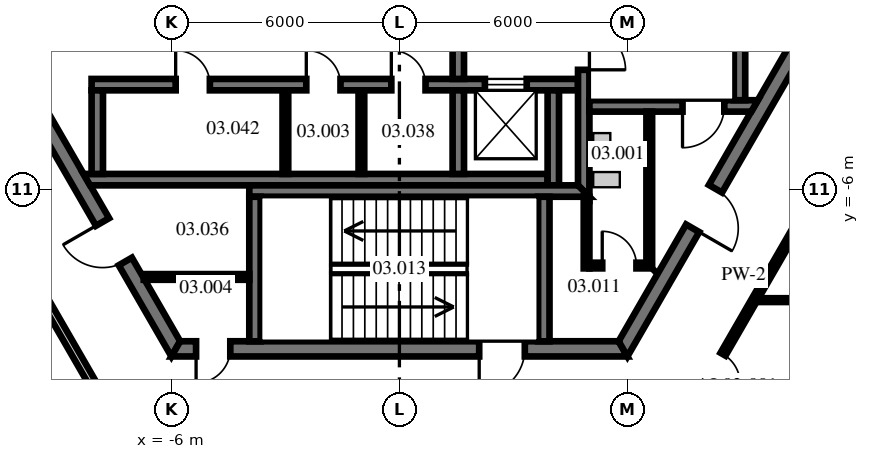
"""IFC4 building model, lengths in metres.
Left out: names, types, materials, properties, quantities, classifications, styles, units other than length and angle.
Written with IfcOpenShell. Run it as: python <this file> out.ifc"""

import sys

from ifc_helpers import new_model, si_unit, direction, frame, frame_2d, origin, place, context, subcontext, project, spatial, polyline, rectangle, outline, extrude, source, transform, mapped, element, fill, save


model = new_model("IFC4")
c1 = context("Model", 3, precision=1e-05, world=origin(), true_north=direction((0.0, 1.0)))
c2 = subcontext(c1, "Body", "Model", "MODEL_VIEW")
j1 = project(units=[si_unit("LENGTHUNIT", "METRE"), si_unit("PLANEANGLEUNIT", "RADIAN")], contexts=[c1])
p1 = place(None, origin())
s1 = spatial("IfcSite", under=j1, at=p1, CompositionType="ELEMENT")
p2 = place(p1, origin())
s2 = spatial("IfcBuilding", under=s1, at=p2, CompositionType="ELEMENT")
p3 = place(p2, frame((0.0, 0.0, 16.0)))
s3 = spatial("IfcBuildingStorey", under=s2, at=p3, CompositionType="ELEMENT", Elevation=16.0)
m1 = source(origin(), c2, "Body", "SweptSolid", [
    extrude(outline(polyline([(-0.115, -0.2), (11.885, -0.2), (11.654, 0.2), (0.115, 0.2), (-0.115, -0.2)])), origin(), (0.0, 0.0, 1.0), 4.1),
])
p4 = place(p3, frame((-11.769, 0.0, 0.0), z_axis=(0.0, 0.0, 1.0), x_axis=(0.499996592174, -0.866027371285, 0.0)))
e1 = element("IfcWall", 1, at=p4, inside=s3, PredefinedType="SHEAR", context=c2, shape_type="MappedRepresentation", body=[
    mapped(m1, transform((0.0, 0.0, 0.0), scale=1.0)),
])
p5 = place(p4, frame((1.405, 0.0, 0.0)))
e2 = element("IfcOpeningElement", 2, at=p5, cuts=e1, PredefinedType="OPENING", context=c2, shape_type="SweptSolid", body=[
    extrude(rectangle(XDim=1.8, YDim=2.1, at=frame_2d((0.9, 1.05))), frame((0.0, 0.21, 0.0), z_axis=(0.0, -1.0, 0.0), x_axis=(1.0, 0.0, 0.0)), (0.0, 0.0, 1.0), 0.42),
])
p6 = place(p4, frame((7.915, 0.0, 0.0)))
e3 = element("IfcOpeningElement", 3, at=p6, cuts=e1, PredefinedType="OPENING", context=c2, shape_type="SweptSolid", body=[
    extrude(rectangle(XDim=1.2, YDim=2.1, at=frame_2d((0.6, 1.05))), frame((0.0, 0.21, 0.0), z_axis=(0.0, -1.0, 0.0), x_axis=(1.0, 0.0, 0.0)), (0.0, 0.0, 1.0), 0.42),
])
p7 = place(p3, frame((-5.885, -10.192, 0.0), z_axis=(0.0, 0.0, 1.0), x_axis=(1.0, 0.0, 0.0)))
e4 = element("IfcWall", 4, at=p7, inside=s3, PredefinedType="SHEAR", context=c2, shape_type="MappedRepresentation", body=[
    mapped(m1, transform((0.0, 0.0, 0.0), scale=1.0)),
])
p8 = place(p7, frame((7.985, 0.0, 0.0)))
e5 = element("IfcOpeningElement", 5, at=p8, cuts=e4, PredefinedType="OPENING", context=c2, shape_type="SweptSolid", body=[
    extrude(rectangle(XDim=1.2, YDim=2.1, at=frame_2d((0.6, 1.05))), frame((0.0, 0.21, 0.0), z_axis=(0.0, -1.0, 0.0), x_axis=(1.0, 0.0, 0.0)), (0.0, 0.0, 1.0), 0.42),
])
p9 = place(p7, frame((0.534, 0.0, 0.0)))
e6 = element("IfcOpeningElement", 6, at=p9, cuts=e4, PredefinedType="OPENING", context=c2, shape_type="SweptSolid", body=[
    extrude(rectangle(XDim=0.9, YDim=2.1, at=frame_2d((0.45, 1.05))), frame((0.0, 0.21, 0.0), z_axis=(0.0, -1.0, 0.0), x_axis=(1.0, 0.0, 0.0)), (0.0, 0.0, 1.0), 0.42),
])
p10 = place(p3, frame((5.885, -10.192, 0.0), z_axis=(0.0, 0.0, 1.0), x_axis=(0.499996592174, 0.866027371285, 0.0)))
e7 = element("IfcWall", 7, at=p10, inside=s3, PredefinedType="SHEAR", context=c2, shape_type="MappedRepresentation", body=[
    mapped(m1, transform((0.0, 0.0, 0.0), scale=1.0)),
])
p11 = place(p10, frame((3.665, 0.0, 0.0)))
e8 = element("IfcOpeningElement", 8, at=p11, cuts=e7, PredefinedType="OPENING", context=c2, shape_type="SweptSolid", body=[
    extrude(rectangle(XDim=1.2, YDim=2.1, at=frame_2d((0.6, 1.05))), frame((0.0, 0.21, 0.0), z_axis=(0.0, -1.0, 0.0), x_axis=(1.0, 0.0, 0.0)), (0.0, 0.0, 1.0), 0.42),
])
m2 = source(origin(), c2, "Body", "SweptSolid", [
    extrude(rectangle(XDim=12.8, YDim=0.3, at=frame_2d((6.4, 0.0))), origin(), (0.0, 0.0, 1.0), 4.1),
])
p12 = place(p3, frame((-8.1, -3.24, 0.0), z_axis=(0.0, 0.0, 1.0), x_axis=(1.0, 0.0, 0.0)))
e9 = element("IfcWall", 9, at=p12, inside=s3, PredefinedType="SHEAR", context=c2, shape_type="MappedRepresentation", body=[
    mapped(m2, transform((0.0, 0.0, 0.0), scale=1.0)),
])
p13 = place(p12, frame((2.212, 0.0, 0.0)))
e10 = element("IfcOpeningElement", 10, at=p13, cuts=e9, PredefinedType="OPENING", context=c2, shape_type="SweptSolid", body=[
    extrude(rectangle(XDim=0.9, YDim=2.1, at=frame_2d((0.45, 1.05))), frame((0.0, 0.16, 0.0), z_axis=(0.0, -1.0, 0.0), x_axis=(1.0, 0.0, 0.0)), (0.0, 0.0, 1.0), 0.32),
])
p14 = place(p12, frame((5.65, 0.0, 0.0)))
e11 = element("IfcOpeningElement", 11, at=p14, cuts=e9, PredefinedType="OPENING", context=c2, shape_type="SweptSolid", body=[
    extrude(rectangle(XDim=0.9, YDim=2.1, at=frame_2d((0.45, 1.05))), frame((0.0, 0.16, 0.0), z_axis=(0.0, -1.0, 0.0), x_axis=(1.0, 0.0, 0.0)), (0.0, 0.0, 1.0), 0.32),
])
p15 = place(p12, frame((7.887, 0.0, 0.0)))
e12 = element("IfcOpeningElement", 12, at=p15, cuts=e9, PredefinedType="OPENING", context=c2, shape_type="SweptSolid", body=[
    extrude(rectangle(XDim=0.9, YDim=2.1, at=frame_2d((0.45, 1.05))), frame((0.0, 0.16, 0.0), z_axis=(0.0, -1.0, 0.0), x_axis=(1.0, 0.0, 0.0)), (0.0, 0.0, 1.0), 0.32),
])
p16 = place(p12, frame((10.35, 0.0, 0.0)))
e13 = element("IfcOpeningElement", 13, at=p16, cuts=e9, PredefinedType="OPENING", context=c2, shape_type="SweptSolid", body=[
    extrude(rectangle(XDim=1.1, YDim=2.1, at=frame_2d((0.55, 1.05))), frame((0.0, 0.16, 0.0), z_axis=(0.0, -1.0, 0.0), x_axis=(1.0, 0.0, 0.0)), (0.0, 0.0, 1.0), 0.32),
])
m3 = source(origin(), c2, "Body", "SweptSolid", [
    extrude(outline(polyline([(12.0, -0.15), (-0.04, -0.15), (-0.213, 0.15), (12.0, 0.15), (12.0, -0.15)])), origin(), (0.0, 0.0, 1.0), 4.1),
])
p17 = place(p3, frame((-8.1, -5.74, 0.0), z_axis=(0.0, 0.0, 1.0), x_axis=(1.0, 0.0, 0.0)))
e14 = element("IfcWall", 14, at=p17, inside=s3, PredefinedType="SHEAR", context=c2, shape_type="MappedRepresentation", body=[
    mapped(m3, transform((0.0, 0.0, 0.0), scale=1.0)),
])
m4 = source(origin(), c2, "Body", "SweptSolid", [
    extrude(rectangle(XDim=2.2, YDim=0.3, at=frame_2d((1.1, 0.0))), origin(), (0.0, 0.0, 1.0), 4.1),
])
for number, where, z_axis, x_axis in (
    (15, (-7.95, -5.59, 0.0), (0.0, 0.0, 1.0), (0.0, 1.0, 0.0)),
    (16, (1.55, -5.59, 0.0), (0.0, 0.0, 1.0), (0.0, 1.0, 0.0)),
):
    element("IfcWall", number, at=place(p3, frame(where, z_axis=z_axis, x_axis=x_axis)), inside=s3, PredefinedType="SHEAR", context=c2, shape_type="MappedRepresentation", body=[
        mapped(m4, transform((0.0, 0.0, 0.0), scale=1.0)),
    ])
m5 = source(origin(), c2, "Body", "SweptSolid", [
    extrude(rectangle(XDim=2.5, YDim=0.3, at=frame_2d((1.25, 0.0))), origin(), (0.0, 0.0, 1.0), 4.1),
])
p18 = place(p3, frame((4.05, -5.89, 0.0), z_axis=(0.0, 0.0, 1.0), x_axis=(0.0, 1.0, 0.0)))
e17 = element("IfcWall", 17, at=p18, inside=s3, PredefinedType="SHEAR", context=c2, shape_type="MappedRepresentation", body=[
    mapped(m5, transform((0.0, 0.0, 0.0), scale=1.0)),
])
m6 = source(origin(), c2, "Body", "SweptSolid", [
    extrude(rectangle(XDim=3.0, YDim=0.3, at=frame_2d((1.5, 0.0))), origin(), (0.0, 0.0, 1.0), 4.1),
])
p19 = place(p3, frame((1.55, -3.09, 0.0), z_axis=(0.0, 0.0, 1.0), x_axis=(0.0, 1.0, 0.0)))
e18 = element("IfcWall", 18, at=p19, inside=s3, PredefinedType="SHEAR", context=c2, shape_type="MappedRepresentation", body=[
    mapped(m6, transform((0.0, 0.0, 0.0), scale=1.0)),
])
p20 = place(p19, frame((0.9, 0.0, 0.0)))
e19 = element("IfcOpeningElement", 19, at=p20, cuts=e18, PredefinedType="OPENING", context=c2, shape_type="SweptSolid", body=[
    extrude(rectangle(XDim=1.2, YDim=2.1, at=frame_2d((0.6, 1.05))), frame((0.0, 0.16, 0.0), z_axis=(0.0, -1.0, 0.0), x_axis=(1.0, 0.0, 0.0)), (0.0, 0.0, 1.0), 0.32),
])
m7 = source(origin(), c2, "Body", "SweptSolid", [
    extrude(outline(polyline([(-0.15, -0.15), (9.99, -0.15), (9.99, 0.15), (0.15, 0.15), (-0.15, -0.15)])), origin(), (0.0, 0.0, 1.0), 4.1),
])
p21 = place(p3, frame((4.85, -6.04, 0.0), z_axis=(0.0, 0.0, 1.0), x_axis=(0.0, 1.0, 0.0)))
e20 = element("IfcWall", 20, at=p21, inside=s3, PredefinedType="SHEAR", context=c2, shape_type="MappedRepresentation", body=[
    mapped(m7, transform((0.0, 0.0, 0.0), scale=1.0)),
])
p22 = place(p21, frame((3.19, 0.0, 0.0)))
e21 = element("IfcOpeningElement", 21, at=p22, cuts=e20, PredefinedType="OPENING", context=c2, shape_type="SweptSolid", body=[
    extrude(rectangle(XDim=1.1, YDim=2.1, at=frame_2d((0.55, 1.05))), frame((0.0, 0.16, 0.0), z_axis=(0.0, -1.0, 0.0), x_axis=(1.0, 0.0, 0.0)), (0.0, 0.0, 1.0), 0.32),
])
m8 = source(origin(), c2, "Body", "SweptSolid", [
    extrude(outline(polyline([(0.0, -0.15), (0.0, 0.15), (4.433, 0.15), (4.26, -0.15), (0.0, -0.15)])), origin(), (0.0, 0.0, 1.0), 4.1),
])
p23 = place(p3, frame((5.0, -3.8, 0.0), z_axis=(0.0, 0.0, 1.0), x_axis=(1.0, 0.0, 0.0)))
e22 = element("IfcWall", 22, at=p23, inside=s3, PredefinedType="SHEAR", context=c2, shape_type="MappedRepresentation", body=[
    mapped(m8, transform((0.0, 0.0, 0.0), scale=1.0)),
])
p24 = place(p23, frame((2.45, 0.0, 0.0)))
e23 = element("IfcOpeningElement", 23, at=p24, cuts=e22, PredefinedType="OPENING", context=c2, shape_type="SweptSolid", body=[
    extrude(rectangle(XDim=1.1, YDim=2.1, at=frame_2d((0.55, 1.05))), frame((0.0, 0.16, 0.0), z_axis=(0.0, -1.0, 0.0), x_axis=(1.0, 0.0, 0.0)), (0.0, 0.0, 1.0), 0.32),
])
m9 = source(origin(), c2, "Body", "SweptSolid", [
    extrude(rectangle(XDim=7.3, YDim=0.3, at=frame_2d((3.65, 0.0))), origin(), (0.0, 0.0, 1.0), 4.1),
])
p25 = place(p3, frame((8.95, -3.65, 0.0), z_axis=(0.0, 0.0, 1.0), x_axis=(0.0, 1.0, 0.0)))
e24 = element("IfcWall", 24, at=p25, inside=s3, PredefinedType="SHEAR", context=c2, shape_type="MappedRepresentation", body=[
    mapped(m9, transform((0.0, 0.0, 0.0), scale=1.0)),
])
m10 = source(origin(), c2, "Body", "SweptSolid", [
    extrude(outline(polyline([(0.0, -0.15), (8.95, -0.15), (8.65, 0.15), (0.0, 0.15), (0.0, -0.15)])), origin(), (0.0, 0.0, 1.0), 4.1),
])
p26 = place(p3, frame((-3.95, -6.04, 0.0), z_axis=(0.0, 0.0, 1.0), x_axis=(1.0, 0.0, 0.0)))
e25 = element("IfcWall", 25, at=p26, inside=s3, PredefinedType="SHEAR", context=c2, shape_type="MappedRepresentation", body=[
    mapped(m10, transform((0.0, 0.0, 0.0), scale=1.0)),
])
m11 = source(origin(), c2, "Body", "SweptSolid", [
    extrude(outline(polyline([(3.8, -0.15), (-0.004, -0.15), (-0.004, 0.15), (3.8, 0.15), (3.8, -0.15)])), origin(), (0.0, 0.0, 1.0), 4.1),
])
for number, where, z_axis, x_axis in (
    (26, (-3.8, -9.99, 0.0), (0.0, 0.0, 1.0), (0.0, 1.0, 0.0)),
    (27, (3.8, -9.99, 0.0), (0.0, 0.0, 1.0), (0.0, 1.0, 0.0)),
):
    element("IfcWall", number, at=place(p3, frame(where, z_axis=z_axis, x_axis=x_axis)), inside=s3, PredefinedType="SHEAR", context=c2, shape_type="MappedRepresentation", body=[
        mapped(m11, transform((0.0, 0.0, 0.0), scale=1.0)),
    ])
m12 = source(origin(), c2, "Body", "SweptSolid", [
    extrude(rectangle(XDim=2.2, YDim=0.15, at=frame_2d((1.1, 0.0))), origin(), (0.0, 0.0, 1.0), 4.1),
])
for number, where, z_axis, x_axis in (
    (28, (-3.0, -5.59, 0.0), (0.0, 0.0, 1.0), (0.0, 1.0, 0.0)),
    (29, (-1.0, -5.59, 0.0), (0.0, 0.0, 1.0), (0.0, 1.0, 0.0)),
):
    element("IfcWall", number, at=place(p3, frame(where, z_axis=z_axis, x_axis=x_axis)), inside=s3, PredefinedType="PARTITIONING", context=c2, shape_type="MappedRepresentation", body=[
        mapped(m12, transform((0.0, 0.0, 0.0), scale=1.0)),
    ])
p27 = place(p3, frame((-6.727, -8.3, 0.0), z_axis=(0.0, 0.0, 1.0), x_axis=(1.0, 0.0, 0.0)))
e30 = element("IfcWall", 30, at=p27, inside=s3, PredefinedType="PARTITIONING", context=c2, shape_type="SweptSolid", body=[
    extrude(rectangle(XDim=2.777, YDim=0.15, at=frame_2d((1.389, 0.0))), origin(), (0.0, 0.0, 1.0), 4.1),
])
m13 = source(origin(), c2, "Body", "SweptSolid", [
    extrude(outline(polyline([(0.0, -0.075), (1.65, -0.075), (1.5, 0.075), (0.0, 0.075), (0.0, -0.075)])), origin(), (0.0, 0.0, 1.0), 4.1),
])
p28 = place(p3, frame((5.0, -8.0, 0.0), z_axis=(0.0, 0.0, 1.0), x_axis=(1.0, 0.0, 0.0)))
e31 = element("IfcWall", 31, at=p28, inside=s3, PredefinedType="PARTITIONING", context=c2, shape_type="MappedRepresentation", body=[
    mapped(m13, transform((0.0, 0.0, 0.0), scale=1.0)),
])
p29 = place(p28, frame((0.337, 0.0, 0.0)))
e32 = element("IfcOpeningElement", 32, at=p29, cuts=e31, PredefinedType="OPENING", context=c2, shape_type="SweptSolid", body=[
    extrude(rectangle(XDim=0.9, YDim=2.1, at=frame_2d((0.45, 1.05))), frame((0.0, 0.085, 0.0), z_axis=(0.0, -1.0, 0.0), x_axis=(1.0, 0.0, 0.0)), (0.0, 0.0, 1.0), 0.17),
])
p30 = place(p3, frame((6.575, -8.0, 0.0), z_axis=(0.0, 0.0, 1.0), x_axis=(0.0, 1.0, 0.0)))
e33 = element("IfcWall", 33, at=p30, inside=s3, PredefinedType="PARTITIONING", context=c2, shape_type="SweptSolid", body=[
    extrude(outline(polyline([(-0.075, -0.075), (4.05, -0.075), (4.05, 0.075), (0.075, 0.075), (-0.075, -0.075)])), origin(), (0.0, 0.0, 1.0), 4.1),
])
p31 = place(p3, frame((4.925, -8.075, 0.0), z_axis=(0.0, 0.0, 1.0), x_axis=(0.0, 1.0, 0.0)))
e34 = element("IfcWall", 34, at=p31, inside=s3, PredefinedType="PARTITIONING", context=c2, shape_type="SweptSolid", body=[
    extrude(rectangle(XDim=1.885, YDim=0.15, at=frame_2d((0.942, 0.0))), origin(), (0.0, 0.0, 1.0), 4.1),
])
p32 = place(p3, frame((-11.818, -4.615, 0.0), z_axis=(0.0, 0.0, 1.0), x_axis=(0.500011831956, -0.866018572493, 0.0)))
e35 = element("IfcWall", 35, at=p32, inside=s3, PredefinedType="PARTITIONING", context=c2, shape_type="SweptSolid", body=[
    extrude(rectangle(XDim=9.153, YDim=0.2, at=frame_2d((4.577, 0.0))), origin(), (0.0, 0.0, 1.0), 4.1),
])
m14 = source(origin(), c2, "Body", "SweptSolid", [
    extrude(rectangle(XDim=12.148, YDim=0.1, at=frame_2d((6.074, 0.0))), origin(), (0.0, 0.0, 1.0), 3.343),
])
p33 = place(p3, frame((9.338, -8.91, 0.0), z_axis=(0.0, 0.0, 1.0), x_axis=(1.0, 0.0, 0.0)))
e36 = element("IfcWall", 36, at=p33, inside=s3, PredefinedType="PARTITIONING", context=c2, shape_type="MappedRepresentation", body=[
    mapped(m14, transform((0.0, 0.0, 0.0), scale=1.0)),
])
p34 = place(p3, frame((7.251, -12.525, 0.0), z_axis=(0.0, 0.0, 1.0), x_axis=(0.499988071196, 0.866032290773, 0.0)))
e37 = element("IfcWall", 37, at=p34, inside=s3, PredefinedType="PARTITIONING", context=c2, shape_type="SweptSolid", body=[
    extrude(rectangle(XDim=9.203, YDim=0.15, at=frame_2d((4.602, 0.0))), origin(), (0.0, 0.0, 1.0), 4.1),
])
p35 = place(p34, frame((1.63, 0.0, 0.0)))
e38 = element("IfcOpeningElement", 38, at=p35, cuts=e37, PredefinedType="OPENING", context=c2, shape_type="SweptSolid", body=[
    extrude(rectangle(XDim=0.9, YDim=2.1, at=frame_2d((0.45, 1.05))), frame((0.0, 0.085, 0.0), z_axis=(0.0, -1.0, 0.0), x_axis=(1.0, 0.0, 0.0)), (0.0, 0.0, 1.0), 0.17),
])
p36 = place(p8, frame((1.2, 0.0, 0.0), z_axis=(0.0, 0.0, 1.0), x_axis=(-1.0, 0.0, 0.0)))
e39 = element("IfcDoor", 39, at=p36, inside=s3, OperationType="SINGLE_SWING_RIGHT", PredefinedType="DOOR", context=c2, shape_type="SweptSolid", body=[
    extrude(rectangle(XDim=1.2, YDim=2.1, at=frame_2d((0.6, 1.05))), frame((0.0, 0.025, 0.0), z_axis=(0.0, -1.0, 0.0), x_axis=(1.0, 0.0, 0.0)), (0.0, 0.0, 1.0), 0.05),
])
fill(e5, e39)
p37 = place(p11, frame((1.2, 0.0, 0.0), z_axis=(0.0, 0.0, 1.0), x_axis=(-1.0, 0.0, 0.0)))
e40 = element("IfcDoor", 40, at=p37, inside=s3, OperationType="SINGLE_SWING_RIGHT", PredefinedType="DOOR", context=c2, shape_type="SweptSolid", body=[
    extrude(rectangle(XDim=1.2, YDim=2.1, at=frame_2d((0.6, 1.05))), frame((0.0, 0.025, 0.0), z_axis=(0.0, -1.0, 0.0), x_axis=(1.0, 0.0, 0.0)), (0.0, 0.0, 1.0), 0.05),
])
fill(e8, e40)
p38 = place(p22, frame((1.1, 0.0, 0.0), z_axis=(0.0, 0.0, 1.0), x_axis=(-1.0, 0.0, 0.0)))
e41 = element("IfcDoor", 41, at=p38, inside=s3, OperationType="SINGLE_SWING_RIGHT", PredefinedType="DOOR", context=c2, shape_type="SweptSolid", body=[
    extrude(rectangle(XDim=1.1, YDim=2.1, at=frame_2d((0.55, 1.05))), frame((0.0, 0.025, 0.0), z_axis=(0.0, -1.0, 0.0), x_axis=(1.0, 0.0, 0.0)), (0.0, 0.0, 1.0), 0.05),
])
fill(e21, e41)
p39 = place(p24, frame((1.1, 0.0, 0.0), z_axis=(0.0, 0.0, 1.0), x_axis=(-1.0, 0.0, 0.0)))
e42 = element("IfcDoor", 42, at=p39, inside=s3, OperationType="SINGLE_SWING_RIGHT", PredefinedType="DOOR", context=c2, shape_type="SweptSolid", body=[
    extrude(rectangle(XDim=1.1, YDim=2.1, at=frame_2d((0.55, 1.05))), frame((0.0, 0.025, 0.0), z_axis=(0.0, -1.0, 0.0), x_axis=(1.0, 0.0, 0.0)), (0.0, 0.0, 1.0), 0.05),
])
fill(e23, e42)
p40 = place(p13, origin())
e43 = element("IfcDoor", 43, at=p40, inside=s3, OperationType="SINGLE_SWING_LEFT", PredefinedType="DOOR", context=c2, shape_type="SweptSolid", body=[
    extrude(rectangle(XDim=0.9, YDim=2.1, at=frame_2d((0.45, 1.05))), frame((0.0, 0.025, 0.0), z_axis=(0.0, -1.0, 0.0), x_axis=(1.0, 0.0, 0.0)), (0.0, 0.0, 1.0), 0.05),
])
fill(e10, e43)
p41 = place(p14, origin())
e44 = element("IfcDoor", 44, at=p41, inside=s3, OperationType="SINGLE_SWING_LEFT", PredefinedType="DOOR", context=c2, shape_type="SweptSolid", body=[
    extrude(rectangle(XDim=0.9, YDim=2.1, at=frame_2d((0.45, 1.05))), frame((0.0, 0.025, 0.0), z_axis=(0.0, -1.0, 0.0), x_axis=(1.0, 0.0, 0.0)), (0.0, 0.0, 1.0), 0.05),
])
fill(e11, e44)
p42 = place(p15, origin())
e45 = element("IfcDoor", 45, at=p42, inside=s3, OperationType="SINGLE_SWING_LEFT", PredefinedType="DOOR", context=c2, shape_type="SweptSolid", body=[
    extrude(rectangle(XDim=0.9, YDim=2.1, at=frame_2d((0.45, 1.05))), frame((0.0, 0.025, 0.0), z_axis=(0.0, -1.0, 0.0), x_axis=(1.0, 0.0, 0.0)), (0.0, 0.0, 1.0), 0.05),
])
fill(e12, e45)
p43 = place(p6, frame((1.2, 0.0, 0.0), z_axis=(0.0, 0.0, 1.0), x_axis=(-1.0, 0.0, 0.0)))
e46 = element("IfcDoor", 46, at=p43, inside=s3, OperationType="SINGLE_SWING_RIGHT", PredefinedType="DOOR", context=c2, shape_type="SweptSolid", body=[
    extrude(rectangle(XDim=1.2, YDim=2.1, at=frame_2d((0.6, 1.05))), frame((0.0, 0.025, 0.0), z_axis=(0.0, -1.0, 0.0), x_axis=(1.0, 0.0, 0.0)), (0.0, 0.0, 1.0), 0.05),
])
fill(e3, e46)
p44 = place(p9, frame((0.9, 0.0, 0.0), z_axis=(0.0, 0.0, 1.0), x_axis=(-1.0, 0.0, 0.0)))
e47 = element("IfcDoor", 47, at=p44, inside=s3, OperationType="SINGLE_SWING_RIGHT", PredefinedType="DOOR", context=c2, shape_type="SweptSolid", body=[
    extrude(rectangle(XDim=0.9, YDim=2.1, at=frame_2d((0.45, 1.05))), frame((0.0, 0.025, 0.0), z_axis=(0.0, -1.0, 0.0), x_axis=(1.0, 0.0, 0.0)), (0.0, 0.0, 1.0), 0.05),
])
fill(e6, e47)
p45 = place(p29, origin())
e48 = element("IfcDoor", 48, at=p45, inside=s3, OperationType="SINGLE_SWING_LEFT", PredefinedType="DOOR", context=c2, shape_type="SweptSolid", body=[
    extrude(rectangle(XDim=0.9, YDim=2.1, at=frame_2d((0.45, 1.05))), frame((0.0, 0.025, 0.0), z_axis=(0.0, -1.0, 0.0), x_axis=(1.0, 0.0, 0.0)), (0.0, 0.0, 1.0), 0.05),
])
fill(e32, e48)
p46 = place(p16, origin())
e49 = element("IfcDoor", 49, at=p46, inside=s3, OperationType="DOUBLE_DOOR_SLIDING", PredefinedType="DOOR", context=c2, shape_type="SweptSolid", body=[
    extrude(rectangle(XDim=1.1, YDim=2.1, at=frame_2d((0.55, 1.05))), frame((0.0, 0.025, 0.0), z_axis=(0.0, -1.0, 0.0), x_axis=(1.0, 0.0, 0.0)), (0.0, 0.0, 1.0), 0.05),
])
fill(e13, e49)
p47 = place(p35, origin())
e50 = element("IfcDoor", 50, at=p47, inside=s3, OperationType="SINGLE_SWING_RIGHT", PredefinedType="DOOR", context=c2, shape_type="SweptSolid", body=[
    extrude(rectangle(XDim=0.9, YDim=2.1, at=frame_2d((0.45, 1.05))), frame((0.0, 0.025, 0.0), z_axis=(0.0, -1.0, 0.0), x_axis=(1.0, 0.0, 0.0)), (0.0, 0.0, 1.0), 0.05),
])
fill(e38, e50)
save(model, sys.argv[1])
